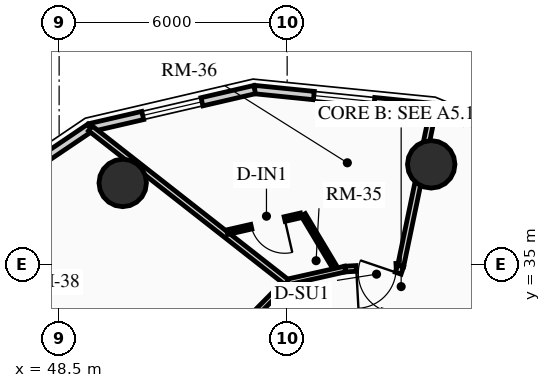
"""IFC4 building model, lengths in metres.
Left out: names, types, materials, properties, quantities, classifications, styles, units other than length and angle.
Written with IfcOpenShell. Run it as: python <this file> out.ifc"""

import sys

from ifc_helpers import new_model, si_unit, direction, frame, frame_2d, origin, origin_2d, place, context, subcontext, project, spatial, rectangle, circle, extrude, source, transform, mapped, element, fill, save


model = new_model("IFC4")
c1 = context("Model", 3, precision=1e-05, world=origin(), true_north=direction((0.0, 1.0)))
c2 = subcontext(c1, "Body", "Model", "MODEL_VIEW")
j1 = project(units=[si_unit("LENGTHUNIT", "METRE"), si_unit("PLANEANGLEUNIT", "RADIAN")], contexts=[c1])
p1 = place(None, origin())
s1 = spatial("IfcSite", under=j1, at=p1, CompositionType="ELEMENT")
p2 = place(p1, origin())
s2 = spatial("IfcBuilding", under=s1, at=p2, CompositionType="ELEMENT")
p3 = place(p2, frame((0.0, 0.0, 183.61)))
s3 = spatial("IfcBuildingStorey", under=s2, at=p3, CompositionType="ELEMENT", Elevation=183.61)
for number, where, z_axis, x_axis in (
    (1, (58.291, 37.635, 0.0), (0.0, 0.0, 1.0), (1.0, 0.0, 0.0)),
    (2, (50.173, 37.146, 0.0), (0.0, 0.0, 1.0), (1.0, 0.0, 0.0)),
):
    element("IfcColumn", number, at=place(p3, frame(where, z_axis=z_axis, x_axis=x_axis)), inside=s3, PredefinedType="USERDEFINED", context=c2, shape_type="SweptSolid", body=[
        extrude(circle(Radius=0.625, at=origin_2d()), origin(), (0.0, 0.0, 1.0), 2.91),
    ])
p4 = place(p3, frame((58.354, 39.127, 0.0), z_axis=(0.0, 0.0, 1.0), x_axis=(0.924556017656, -0.381046152345, 0.0)))
e3 = element("IfcWall", 3, at=p4, inside=s3, PredefinedType="SOLIDWALL", context=c2, shape_type="SweptSolid", body=[
    extrude(rectangle(XDim=0.87, YDim=0.22, at=frame_2d((0.435, 0.0))), origin(), (0.0, 0.0, 1.0), 2.245),
])
p5 = place(p3, frame((53.645, 39.603, 0.0), z_axis=(0.0, 0.0, 1.0), x_axis=(0.994943283129, -0.100438356004, 0.0)))
e4 = element("IfcWall", 4, at=p5, inside=s3, PredefinedType="SOLIDWALL", context=c2, shape_type="SweptSolid", body=[
    extrude(rectangle(XDim=4.733, YDim=0.22, at=frame_2d((2.366, 0.0))), origin(), (0.0, 0.0, 1.0), 2.245),
])
m1 = source(origin(), c2, "Body", "SweptSolid", [
    extrude(rectangle(XDim=1.6, YDim=1.3, at=frame_2d((0.8, 0.65))), frame((0.0, 0.12, 0.0), z_axis=(0.0, -1.0, 0.0), x_axis=(1.0, 0.0, 0.0)), (0.0, 0.0, 1.0), 0.24),
])
p6 = place(p5, frame((1.566, 0.0, 0.65)))
e5 = element("IfcOpeningElement", 5, at=p6, cuts=e4, PredefinedType="OPENING", context=c2, shape_type="MappedRepresentation", body=[
    mapped(m1, transform((0.0, 0.0, 0.0), x_axis=(1.0, 0.0, 0.0), y_axis=(0.0, 1.0, 0.0), z_axis=(0.0, 0.0, 1.0), scale=1.0)),
])
p7 = place(p3, frame((49.313, 38.6, 0.0), z_axis=(0.0, 0.0, 1.0), x_axis=(0.97422620202, 0.22557328587, 0.0)))
e6 = element("IfcWall", 6, at=p7, inside=s3, PredefinedType="SOLIDWALL", context=c2, shape_type="SweptSolid", body=[
    extrude(rectangle(XDim=4.446, YDim=0.22, at=frame_2d((2.223, 0.0))), origin(), (0.0, 0.0, 1.0), 2.245),
])
p8 = place(p7, frame((1.423, 0.0, 0.65)))
e7 = element("IfcOpeningElement", 7, at=p8, cuts=e6, PredefinedType="OPENING", context=c2, shape_type="MappedRepresentation", body=[
    mapped(m1, transform((0.0, 0.0, 0.0), x_axis=(1.0, 0.0, 0.0), y_axis=(0.0, 1.0, 0.0), z_axis=(0.0, 0.0, 1.0), scale=1.0)),
])
p9 = place(p3, frame((45.783, 36.217, 0.0), z_axis=(0.0, 0.0, 1.0), x_axis=(0.828817439852, 0.55951912514, 0.0)))
e8 = element("IfcWall", 8, at=p9, inside=s3, PredefinedType="SOLIDWALL", context=c2, shape_type="SweptSolid", body=[
    extrude(rectangle(XDim=4.259, YDim=0.22, at=frame_2d((2.129, 0.0))), origin(), (0.0, 0.0, 1.0), 2.245),
])
p10 = place(p3, frame((57.486, 34.96, 0.0), z_axis=(0.0, 0.0, 1.0), x_axis=(-0.998483871836, -0.055045051404, 0.0)))
e9 = element("IfcWall", 9, at=p10, inside=s3, PredefinedType="PARTITIONING", context=c2, shape_type="SweptSolid", body=[
    extrude(rectangle(XDim=1.464, YDim=0.15, at=frame_2d((0.732, 0.0))), origin(), (0.0, 0.0, 1.0), 2.245),
])
m2 = source(origin(), c2, "Body", "SweptSolid", [
    extrude(rectangle(XDim=1.05, YDim=2.015, at=frame_2d((0.525, 1.007))), frame((0.0, 0.085, 0.0), z_axis=(0.0, -1.0, 0.0), x_axis=(1.0, 0.0, 0.0)), (0.0, 0.0, 1.0), 0.17),
])
p11 = place(p10, frame((0.12, 0.0, 0.0)))
e10 = element("IfcOpeningElement", 10, at=p11, cuts=e9, PredefinedType="OPENING", context=c2, shape_type="MappedRepresentation", body=[
    mapped(m2, transform((0.0, 0.0, 0.0), x_axis=(1.0, 0.0, 0.0), y_axis=(0.0, 1.0, 0.0), z_axis=(0.0, 0.0, 1.0), scale=1.0)),
])
p12 = place(p3, frame((56.025, 34.88, 0.0), z_axis=(0.0, 0.0, 1.0), x_axis=(-0.975729093394, -0.218981132301, 0.0)))
e11 = element("IfcWall", 11, at=p12, inside=s3, PredefinedType="PARTITIONING", context=c2, shape_type="SweptSolid", body=[
    extrude(rectangle(XDim=1.575, YDim=0.15, at=frame_2d((0.788, 0.0))), origin(), (0.0, 0.0, 1.0), 2.245),
])
p13 = place(p3, frame((54.488, 34.535, 0.0), z_axis=(0.0, 0.0, 1.0), x_axis=(-0.703666289339, -0.710530613871, 0.0)))
e12 = element("IfcWall", 12, at=p13, inside=s3, PredefinedType="PARTITIONING", context=c2, shape_type="SweptSolid", body=[
    extrude(rectangle(XDim=3.343, YDim=0.15, at=frame_2d((1.672, 0.0))), origin(), (0.0, 0.0, 1.0), 2.245),
])
p14 = place(p13, frame((1.66, 0.0, 0.0)))
e13 = element("IfcOpeningElement", 13, at=p14, cuts=e12, PredefinedType="OPENING", context=c2, shape_type="MappedRepresentation", body=[
    mapped(m2, transform((0.0, 0.0, 0.0), x_axis=(1.0, 0.0, 0.0), y_axis=(0.0, 1.0, 0.0), z_axis=(0.0, 0.0, 1.0), scale=1.0)),
])
p15 = place(p3, frame((57.486, 34.96, 0.0), z_axis=(0.0, 0.0, 1.0), x_axis=(0.204011788318, 0.978968431681, 0.0)))
e14 = element("IfcWall", 14, at=p15, inside=s3, PredefinedType="PARTITIONING", context=c2, shape_type="SweptSolid", body=[
    extrude(rectangle(XDim=4.236, YDim=0.16, at=frame_2d((2.118, 0.0))), origin(), (0.0, 0.0, 1.0), 2.245),
])
p16 = place(p3, frame((54.488, 34.535, 0.0), z_axis=(0.0, 0.0, 1.0), x_axis=(-0.787155500995, 0.616754584298, 0.0)))
e15 = element("IfcWall", 15, at=p16, inside=s3, PredefinedType="PARTITIONING", context=c2, shape_type="SweptSolid", body=[
    extrude(rectangle(XDim=6.562, YDim=0.16, at=frame_2d((3.281, 0.0))), origin(), (0.0, 0.0, 1.0), 2.245),
])
p17 = place(p3, frame((56.828, 33.021, 0.0), z_axis=(0.0, 0.0, 1.0), x_axis=(0.321300161671, 0.94697740528, 0.0)))
e16 = element("IfcWall", 16, at=p17, inside=s3, PredefinedType="PARTITIONING", context=c2, shape_type="SweptSolid", body=[
    extrude(rectangle(XDim=2.049, YDim=0.16, at=frame_2d((1.024, 0.0))), origin(), (0.0, 0.0, 1.0), 2.245),
])
m3 = source(origin(), c2, "Body", "SweptSolid", [
    extrude(rectangle(XDim=1.05, YDim=2.015, at=frame_2d((0.525, 1.007))), frame((0.0, 0.09, 0.0), z_axis=(0.0, -1.0, 0.0), x_axis=(1.0, 0.0, 0.0)), (0.0, 0.0, 1.0), 0.18),
])
p18 = place(p17, frame((0.798, 0.0, 0.0)))
e17 = element("IfcOpeningElement", 17, at=p18, cuts=e16, PredefinedType="OPENING", context=c2, shape_type="MappedRepresentation", body=[
    mapped(m3, transform((0.0, 0.0, 0.0), x_axis=(1.0, 0.0, 0.0), y_axis=(0.0, 1.0, 0.0), z_axis=(0.0, 0.0, 1.0), scale=1.0)),
])
p19 = place(p3, frame((55.727, 34.97, 0.0), z_axis=(0.0, 0.0, 1.0), x_axis=(-0.514518774568, 0.857479113808, 0.0)))
e18 = element("IfcWall", 18, at=p19, inside=s3, PredefinedType="PARTITIONING", context=c2, shape_type="SweptSolid", body=[
    extrude(rectangle(XDim=1.56, YDim=0.125, at=frame_2d((0.78, 0.0))), origin(), (0.0, 0.0, 1.0), 2.245),
])
p20 = place(p3, frame((54.864, 36.293, 0.0), z_axis=(0.0, 0.0, 1.0), x_axis=(-0.974875983782, -0.222748324896, 0.0)))
e19 = element("IfcWall", 19, at=p20, inside=s3, PredefinedType="PARTITIONING", context=c2, shape_type="SweptSolid", body=[
    extrude(rectangle(XDim=1.994, YDim=0.125, at=frame_2d((0.997, 0.0))), origin(), (0.0, 0.0, 1.0), 2.675),
])
m4 = source(origin(), c2, "Body", "SweptSolid", [
    extrude(rectangle(XDim=0.9, YDim=2.005, at=frame_2d((0.45, 1.002))), frame((0.0, 0.073, 0.0), z_axis=(0.0, -1.0, 0.0), x_axis=(1.0, 0.0, 0.0)), (0.0, 0.0, 1.0), 0.145),
])
p21 = place(p20, frame((0.44, 0.0, 0.0)))
e20 = element("IfcOpeningElement", 20, at=p21, cuts=e19, PredefinedType="OPENING", context=c2, shape_type="MappedRepresentation", body=[
    mapped(m4, transform((0.0, 0.0, 0.0), x_axis=(1.0, 0.0, 0.0), y_axis=(0.0, 1.0, 0.0), z_axis=(0.0, 0.0, 1.0), scale=1.0)),
])
m5 = source(origin(), c2, "Body", "SweptSolid", [
    extrude(rectangle(XDim=1.6, YDim=1.3, at=frame_2d((0.8, 0.65))), frame((0.0, 0.03, 0.0), z_axis=(0.0, -1.0, 0.0), x_axis=(1.0, 0.0, 0.0)), (0.0, 0.0, 1.0), 0.06),
])
p22 = place(p6, origin())
e21 = element("IfcWindow", 21, at=p22, inside=s3, PartitioningType="SINGLE_PANEL", PredefinedType="WINDOW", context=c2, shape_type="MappedRepresentation", body=[
    mapped(m5, transform((0.0, 0.0, 0.0), x_axis=(1.0, 0.0, 0.0), y_axis=(0.0, 1.0, 0.0), z_axis=(0.0, 0.0, 1.0), scale=1.0)),
])
fill(e5, e21)
p23 = place(p8, origin())
e22 = element("IfcWindow", 22, at=p23, inside=s3, PartitioningType="SINGLE_PANEL", PredefinedType="WINDOW", context=c2, shape_type="MappedRepresentation", body=[
    mapped(m5, transform((0.0, 0.0, 0.0), x_axis=(1.0, 0.0, 0.0), y_axis=(0.0, 1.0, 0.0), z_axis=(0.0, 0.0, 1.0), scale=1.0)),
])
fill(e7, e22)
m6 = source(origin(), c2, "Body", "SweptSolid", [
    extrude(rectangle(XDim=1.05, YDim=2.015, at=frame_2d((0.525, 1.007))), frame((0.0, 0.025, 0.0), z_axis=(0.0, -1.0, 0.0), x_axis=(1.0, 0.0, 0.0)), (0.0, 0.0, 1.0), 0.05),
])
p24 = place(p18, origin())
e23 = element("IfcDoor", 23, at=p24, inside=s3, OperationType="SINGLE_SWING_RIGHT", PredefinedType="DOOR", context=c2, shape_type="MappedRepresentation", body=[
    mapped(m6, transform((0.0, 0.0, 0.0), x_axis=(1.0, 0.0, 0.0), y_axis=(0.0, 1.0, 0.0), z_axis=(0.0, 0.0, 1.0), scale=1.0)),
])
fill(e17, e23)
p25 = place(p11, origin())
e24 = element("IfcDoor", 24, at=p25, inside=s3, OperationType="SINGLE_SWING_RIGHT", PredefinedType="DOOR", context=c2, shape_type="MappedRepresentation", body=[
    mapped(m6, transform((0.0, 0.0, 0.0), x_axis=(1.0, 0.0, 0.0), y_axis=(0.0, 1.0, 0.0), z_axis=(0.0, 0.0, 1.0), scale=1.0)),
])
fill(e10, e24)
m7 = source(origin(), c2, "Body", "SweptSolid", [
    extrude(rectangle(XDim=0.9, YDim=2.005, at=frame_2d((0.45, 1.002))), frame((0.0, 0.025, 0.0), z_axis=(0.0, -1.0, 0.0), x_axis=(1.0, 0.0, 0.0)), (0.0, 0.0, 1.0), 0.05),
])
p26 = place(p21, origin())
e25 = element("IfcDoor", 25, at=p26, inside=s3, OperationType="SINGLE_SWING_LEFT", PredefinedType="DOOR", context=c2, shape_type="MappedRepresentation", body=[
    mapped(m7, transform((0.0, 0.0, 0.0), x_axis=(1.0, 0.0, 0.0), y_axis=(0.0, 1.0, 0.0), z_axis=(0.0, 0.0, 1.0), scale=1.0)),
])
fill(e20, e25)
save(model, sys.argv[1])
